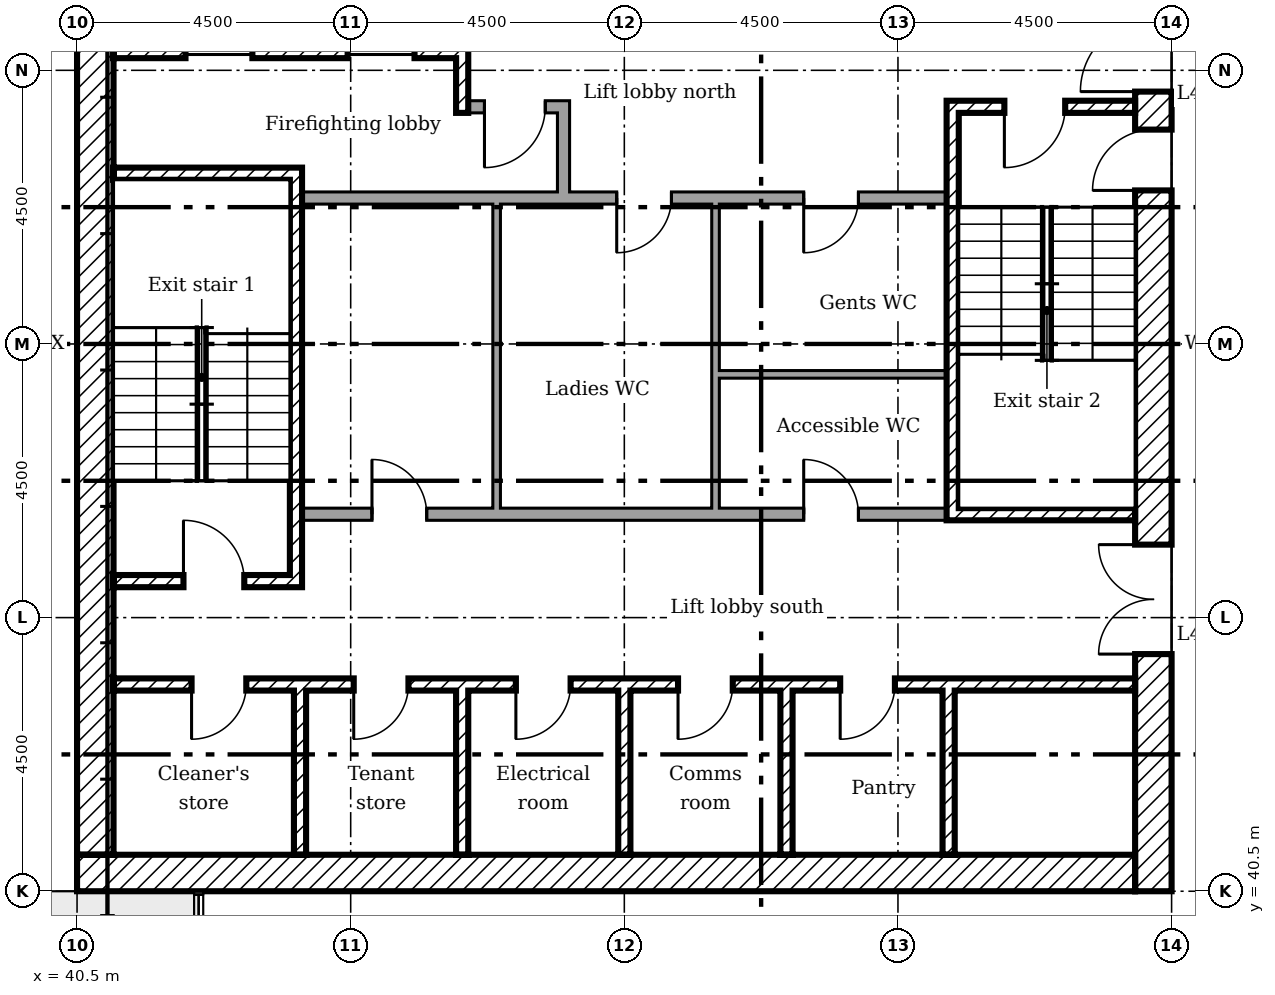
"""IFC4 building model, lengths in metres.
Left out: names, types, materials, properties, quantities, classifications, styles, units other than length and angle.
Written with IfcOpenShell. Run it as: python <this file> out.ifc"""

import sys

from ifc_helpers import new_model, si_unit, direction, frame, frame_2d, origin, place, context, subcontext, project, spatial, rectangle, extrude, element, fill, save


model = new_model("IFC4")
c1 = context("Model", 3, precision=1e-05, world=origin(), true_north=direction((0.0, 1.0)))
c2 = subcontext(c1, "Body", "Model", "MODEL_VIEW")
j1 = project(units=[si_unit("LENGTHUNIT", "METRE"), si_unit("PLANEANGLEUNIT", "RADIAN")], contexts=[c1])
p1 = place(None, origin())
s1 = spatial("IfcSite", under=j1, at=p1, CompositionType="ELEMENT")
p2 = place(p1, origin())
s2 = spatial("IfcBuilding", under=s1, at=p2, CompositionType="ELEMENT")
p3 = place(p2, frame((0.0, 0.0, 161.8)))
s3 = spatial("IfcBuildingStorey", under=s2, at=p3, CompositionType="ELEMENT", Elevation=161.8)
p4 = place(p3, frame((58.2, 40.5, 0.0), z_axis=(0.0, 0.0, 1.0), x_axis=(0.0, 1.0, 0.0)))
e1 = element("IfcWall", 1, at=p4, inside=s3, PredefinedType="SHEAR", context=c2, shape_type="SweptSolid", body=[
    extrude(rectangle(XDim=18.0, YDim=0.6, at=frame_2d((9.0, 0.0))), origin(), (0.0, 0.0, 1.0), 3.35),
])
p5 = place(p4, frame((13.15, 0.0, 0.0)))
e2 = element("IfcOpeningElement", 2, at=p5, cuts=e1, PredefinedType="OPENING", context=c2, shape_type="SweptSolid", body=[
    extrude(rectangle(XDim=1.2, YDim=2.1, at=frame_2d((0.6, 1.05))), frame((0.0, 0.31, 0.0), z_axis=(0.0, -1.0, 0.0), x_axis=(1.0, 0.0, 0.0)), (0.0, 0.0, 1.0), 0.62),
])
p6 = place(p4, frame((3.9, 0.0, 0.0)))
e3 = element("IfcOpeningElement", 3, at=p6, cuts=e1, PredefinedType="OPENING", context=c2, shape_type="SweptSolid", body=[
    extrude(rectangle(XDim=1.8, YDim=2.1, at=frame_2d((0.9, 1.05))), frame((0.0, 0.31, 0.0), z_axis=(0.0, -1.0, 0.0), x_axis=(1.0, 0.0, 0.0)), (0.0, 0.0, 1.0), 0.62),
])
p7 = place(p4, frame((11.525, 0.0, 0.0)))
e4 = element("IfcOpeningElement", 4, at=p7, cuts=e1, PredefinedType="OPENING", context=c2, shape_type="SweptSolid", body=[
    extrude(rectangle(XDim=1.0, YDim=2.1, at=frame_2d((0.5, 1.05))), frame((0.0, 0.31, 0.0), z_axis=(0.0, -1.0, 0.0), x_axis=(1.0, 0.0, 0.0)), (0.0, 0.0, 1.0), 0.62),
])
p8 = place(p3, frame((40.5, 40.8, 0.0)))
e5 = element("IfcWall", 5, at=p8, inside=s3, PredefinedType="SHEAR", context=c2, shape_type="SweptSolid", body=[
    extrude(rectangle(XDim=17.4, YDim=0.6, at=frame_2d((8.7, 0.0))), origin(), (0.0, 0.0, 1.0), 3.35),
])
p9 = place(p3, frame((40.8, 41.1, 0.0), z_axis=(0.0, 0.0, 1.0), x_axis=(0.0, 1.0, 0.0)))
e6 = element("IfcWall", 6, at=p9, inside=s3, PredefinedType="SHEAR", context=c2, shape_type="SweptSolid", body=[
    extrude(rectangle(XDim=16.8, YDim=0.6, at=frame_2d((8.4, 0.0))), origin(), (0.0, 0.0, 1.0), 3.35),
])
p10 = place(p3, frame((46.833, 57.9, 0.0), z_axis=(0.0, 0.0, 1.0), x_axis=(0.0, -1.0, 0.0)))
e7 = element("IfcWall", 7, at=p10, inside=s3, PredefinedType="SHEAR", context=c2, shape_type="SweptSolid", body=[
    extrude(rectangle(XDim=4.6, YDim=0.2, at=frame_2d((2.3, 0.0))), origin(), (0.0, 0.0, 1.0), 3.35),
])
for number, where, z_axis, x_axis in (
    (8, (44.167, 41.1, 0.0), (0.0, 0.0, 1.0), (0.0, 1.0, 0.0)),
    (9, (46.833, 41.1, 0.0), (0.0, 0.0, 1.0), (0.0, 1.0, 0.0)),
    (10, (49.5, 41.1, 0.0), (0.0, 0.0, 1.0), (0.0, 1.0, 0.0)),
    (11, (52.167, 41.1, 0.0), (0.0, 0.0, 1.0), (0.0, 1.0, 0.0)),
    (12, (54.833, 41.1, 0.0), (0.0, 0.0, 1.0), (0.0, 1.0, 0.0)),
):
    element("IfcWall", number, at=place(p3, frame(where, z_axis=z_axis, x_axis=x_axis)), inside=s3, PredefinedType="SHEAR", context=c2, shape_type="SweptSolid", body=[
        extrude(rectangle(XDim=2.7, YDim=0.2, at=frame_2d((1.35, 0.0))), origin(), (0.0, 0.0, 1.0), 3.35),
    ])
p11 = place(p3, frame((48.5, 51.9, 0.0), z_axis=(0.0, 0.0, 1.0), x_axis=(0.0, 1.0, 0.0)))
e13 = element("IfcWall", 13, at=p11, inside=s3, PredefinedType="PARTITIONING", context=c2, shape_type="SweptSolid", body=[
    extrude(rectangle(XDim=1.6, YDim=0.2, at=frame_2d((0.8, 0.0))), origin(), (0.0, 0.0, 1.0), 3.35),
])
p12 = place(p3, frame((46.933, 53.4, 0.0)))
e14 = element("IfcWall", 14, at=p12, inside=s3, PredefinedType="PARTITIONING", context=c2, shape_type="SweptSolid", body=[
    extrude(rectangle(XDim=1.467, YDim=0.2, at=frame_2d((0.733, 0.0))), origin(), (0.0, 0.0, 1.0), 3.35),
])
p13 = place(p12, frame((0.267, 0.0, 0.0)))
e15 = element("IfcOpeningElement", 15, at=p13, cuts=e14, PredefinedType="OPENING", context=c2, shape_type="SweptSolid", body=[
    extrude(rectangle(XDim=1.0, YDim=2.1, at=frame_2d((0.5, 1.05))), frame((0.0, 0.11, 0.0), z_axis=(0.0, -1.0, 0.0), x_axis=(1.0, 0.0, 0.0)), (0.0, 0.0, 1.0), 0.22),
])
p14 = place(p3, frame((41.1, 54.3, 0.0)))
e16 = element("IfcWall", 16, at=p14, inside=s3, PredefinedType="SHEAR", context=c2, shape_type="SweptSolid", body=[
    extrude(rectangle(XDim=5.633, YDim=0.2, at=frame_2d((2.817, 0.0))), origin(), (0.0, 0.0, 1.0), 3.35),
])
p15 = place(p14, frame((1.183, 0.0, 0.0)))
e17 = element("IfcOpeningElement", 17, at=p15, cuts=e16, PredefinedType="OPENING", context=c2, shape_type="SweptSolid", body=[
    extrude(rectangle(XDim=1.1, YDim=2.1, at=frame_2d((0.55, 1.05))), frame((0.0, 0.11, 0.0), z_axis=(0.0, -1.0, 0.0), x_axis=(1.0, 0.0, 0.0)), (0.0, 0.0, 1.0), 0.22),
])
p16 = place(p14, frame((3.85, 0.0, 0.0)))
e18 = element("IfcOpeningElement", 18, at=p16, cuts=e16, PredefinedType="OPENING", context=c2, shape_type="SweptSolid", body=[
    extrude(rectangle(XDim=1.1, YDim=2.1, at=frame_2d((0.55, 1.05))), frame((0.0, 0.11, 0.0), z_axis=(0.0, -1.0, 0.0), x_axis=(1.0, 0.0, 0.0)), (0.0, 0.0, 1.0), 0.22),
])
p17 = place(p3, frame((41.1, 43.9, 0.0)))
e19 = element("IfcWall", 19, at=p17, inside=s3, PredefinedType="SHEAR", context=c2, shape_type="SweptSolid", body=[
    extrude(rectangle(XDim=16.8, YDim=0.2, at=frame_2d((8.4, 0.0))), origin(), (0.0, 0.0, 1.0), 3.35),
])
p18 = place(p17, frame((1.283, 0.0, 0.0)))
e20 = element("IfcOpeningElement", 20, at=p18, cuts=e19, PredefinedType="OPENING", context=c2, shape_type="SweptSolid", body=[
    extrude(rectangle(XDim=0.9, YDim=2.1, at=frame_2d((0.45, 1.05))), frame((0.0, 0.11, 0.0), z_axis=(0.0, -1.0, 0.0), x_axis=(1.0, 0.0, 0.0)), (0.0, 0.0, 1.0), 0.22),
])
p19 = place(p17, frame((3.95, 0.0, 0.0)))
e21 = element("IfcOpeningElement", 21, at=p19, cuts=e19, PredefinedType="OPENING", context=c2, shape_type="SweptSolid", body=[
    extrude(rectangle(XDim=0.9, YDim=2.1, at=frame_2d((0.45, 1.05))), frame((0.0, 0.11, 0.0), z_axis=(0.0, -1.0, 0.0), x_axis=(1.0, 0.0, 0.0)), (0.0, 0.0, 1.0), 0.22),
])
p20 = place(p17, frame((6.617, 0.0, 0.0)))
e22 = element("IfcOpeningElement", 22, at=p20, cuts=e19, PredefinedType="OPENING", context=c2, shape_type="SweptSolid", body=[
    extrude(rectangle(XDim=0.9, YDim=2.1, at=frame_2d((0.45, 1.05))), frame((0.0, 0.11, 0.0), z_axis=(0.0, -1.0, 0.0), x_axis=(1.0, 0.0, 0.0)), (0.0, 0.0, 1.0), 0.22),
])
p21 = place(p17, frame((9.283, 0.0, 0.0)))
e23 = element("IfcOpeningElement", 23, at=p21, cuts=e19, PredefinedType="OPENING", context=c2, shape_type="SweptSolid", body=[
    extrude(rectangle(XDim=0.9, YDim=2.1, at=frame_2d((0.45, 1.05))), frame((0.0, 0.11, 0.0), z_axis=(0.0, -1.0, 0.0), x_axis=(1.0, 0.0, 0.0)), (0.0, 0.0, 1.0), 0.22),
])
p22 = place(p17, frame((11.95, 0.0, 0.0)))
e24 = element("IfcOpeningElement", 24, at=p22, cuts=e19, PredefinedType="OPENING", context=c2, shape_type="SweptSolid", body=[
    extrude(rectangle(XDim=0.9, YDim=2.1, at=frame_2d((0.45, 1.05))), frame((0.0, 0.11, 0.0), z_axis=(0.0, -1.0, 0.0), x_axis=(1.0, 0.0, 0.0)), (0.0, 0.0, 1.0), 0.22),
])
p23 = place(p3, frame((44.1, 45.5, 0.0), z_axis=(0.0, 0.0, 1.0), x_axis=(0.0, 1.0, 0.0)))
e25 = element("IfcWall", 25, at=p23, inside=s3, PredefinedType="SHEAR", context=c2, shape_type="SweptSolid", body=[
    extrude(rectangle(XDim=6.9, YDim=0.2, at=frame_2d((3.45, 0.0))), origin(), (0.0, 0.0, 1.0), 3.35),
])
p24 = place(p3, frame((41.1, 52.3, 0.0)))
e26 = element("IfcWall", 26, at=p24, inside=s3, PredefinedType="SHEAR", context=c2, shape_type="SweptSolid", body=[
    extrude(rectangle(XDim=2.9, YDim=0.2, at=frame_2d((1.45, 0.0))), origin(), (0.0, 0.0, 1.0), 3.35),
])
p25 = place(p3, frame((41.1, 45.6, 0.0)))
e27 = element("IfcWall", 27, at=p25, inside=s3, PredefinedType="SHEAR", context=c2, shape_type="SweptSolid", body=[
    extrude(rectangle(XDim=2.9, YDim=0.2, at=frame_2d((1.45, 0.0))), origin(), (0.0, 0.0, 1.0), 3.35),
])
p26 = place(p25, frame((1.15, 0.0, 0.0)))
e28 = element("IfcOpeningElement", 28, at=p26, cuts=e27, PredefinedType="OPENING", context=c2, shape_type="SweptSolid", body=[
    extrude(rectangle(XDim=1.0, YDim=2.1, at=frame_2d((0.5, 1.05))), frame((0.0, 0.11, 0.0), z_axis=(0.0, -1.0, 0.0), x_axis=(1.0, 0.0, 0.0)), (0.0, 0.0, 1.0), 0.22),
])
p27 = place(p3, frame((54.8, 53.4, 0.0)))
e29 = element("IfcWall", 29, at=p27, inside=s3, PredefinedType="SHEAR", context=c2, shape_type="SweptSolid", body=[
    extrude(rectangle(XDim=3.1, YDim=0.2, at=frame_2d((1.55, 0.0))), origin(), (0.0, 0.0, 1.0), 3.35),
])
p28 = place(p27, frame((0.95, 0.0, 0.0)))
e30 = element("IfcOpeningElement", 30, at=p28, cuts=e29, PredefinedType="OPENING", context=c2, shape_type="SweptSolid", body=[
    extrude(rectangle(XDim=1.0, YDim=2.1, at=frame_2d((0.5, 1.05))), frame((0.0, 0.11, 0.0), z_axis=(0.0, -1.0, 0.0), x_axis=(1.0, 0.0, 0.0)), (0.0, 0.0, 1.0), 0.22),
])
p29 = place(p3, frame((54.8, 46.7, 0.0)))
e31 = element("IfcWall", 31, at=p29, inside=s3, PredefinedType="SHEAR", context=c2, shape_type="SweptSolid", body=[
    extrude(rectangle(XDim=3.1, YDim=0.2, at=frame_2d((1.55, 0.0))), origin(), (0.0, 0.0, 1.0), 3.35),
])
p30 = place(p3, frame((54.9, 46.8, 0.0), z_axis=(0.0, 0.0, 1.0), x_axis=(0.0, 1.0, 0.0)))
e32 = element("IfcWall", 32, at=p30, inside=s3, PredefinedType="SHEAR", context=c2, shape_type="SweptSolid", body=[
    extrude(rectangle(XDim=6.5, YDim=0.2, at=frame_2d((3.25, 0.0))), origin(), (0.0, 0.0, 1.0), 3.35),
])
p31 = place(p3, frame((44.2, 51.9, 0.0)))
e33 = element("IfcWall", 33, at=p31, inside=s3, PredefinedType="PARTITIONING", context=c2, shape_type="SweptSolid", body=[
    extrude(rectangle(XDim=10.6, YDim=0.2, at=frame_2d((5.3, 0.0))), origin(), (0.0, 0.0, 1.0), 3.35),
])
p32 = place(p31, frame((5.175, 0.0, 0.0)))
e34 = element("IfcOpeningElement", 34, at=p32, cuts=e33, PredefinedType="OPENING", context=c2, shape_type="SweptSolid", body=[
    extrude(rectangle(XDim=0.9, YDim=2.1, at=frame_2d((0.45, 1.05))), frame((0.0, 0.11, 0.0), z_axis=(0.0, -1.0, 0.0), x_axis=(1.0, 0.0, 0.0)), (0.0, 0.0, 1.0), 0.22),
])
p33 = place(p31, frame((8.25, 0.0, 0.0)))
e35 = element("IfcOpeningElement", 35, at=p33, cuts=e33, PredefinedType="OPENING", context=c2, shape_type="SweptSolid", body=[
    extrude(rectangle(XDim=0.9, YDim=2.1, at=frame_2d((0.45, 1.05))), frame((0.0, 0.11, 0.0), z_axis=(0.0, -1.0, 0.0), x_axis=(1.0, 0.0, 0.0)), (0.0, 0.0, 1.0), 0.22),
])
p34 = place(p3, frame((44.2, 46.7, 0.0)))
e36 = element("IfcWall", 36, at=p34, inside=s3, PredefinedType="PARTITIONING", context=c2, shape_type="SweptSolid", body=[
    extrude(rectangle(XDim=10.6, YDim=0.2, at=frame_2d((5.3, 0.0))), origin(), (0.0, 0.0, 1.0), 3.35),
])
p35 = place(p34, frame((1.15, 0.0, 0.0)))
e37 = element("IfcOpeningElement", 37, at=p35, cuts=e36, PredefinedType="OPENING", context=c2, shape_type="SweptSolid", body=[
    extrude(rectangle(XDim=0.9, YDim=2.1, at=frame_2d((0.45, 1.05))), frame((0.0, 0.11, 0.0), z_axis=(0.0, -1.0, 0.0), x_axis=(1.0, 0.0, 0.0)), (0.0, 0.0, 1.0), 0.22),
])
p36 = place(p34, frame((8.25, 0.0, 0.0)))
e38 = element("IfcOpeningElement", 38, at=p36, cuts=e36, PredefinedType="OPENING", context=c2, shape_type="SweptSolid", body=[
    extrude(rectangle(XDim=0.9, YDim=2.1, at=frame_2d((0.45, 1.05))), frame((0.0, 0.11, 0.0), z_axis=(0.0, -1.0, 0.0), x_axis=(1.0, 0.0, 0.0)), (0.0, 0.0, 1.0), 0.22),
])
p37 = place(p3, frame((47.4, 46.8, 0.0), z_axis=(0.0, 0.0, 1.0), x_axis=(0.0, 1.0, 0.0)))
e39 = element("IfcWall", 39, at=p37, inside=s3, PredefinedType="PARTITIONING", context=c2, shape_type="SweptSolid", body=[
    extrude(rectangle(XDim=5.0, YDim=0.125, at=frame_2d((2.5, 0.0))), origin(), (0.0, 0.0, 1.0), 3.35),
])
p38 = place(p3, frame((51.0, 46.8, 0.0), z_axis=(0.0, 0.0, 1.0), x_axis=(0.0, 1.0, 0.0)))
e40 = element("IfcWall", 40, at=p38, inside=s3, PredefinedType="PARTITIONING", context=c2, shape_type="SweptSolid", body=[
    extrude(rectangle(XDim=2.262, YDim=0.125, at=frame_2d((1.131, 0.0))), origin(), (0.0, 0.0, 1.0), 3.35),
])
p39 = place(p3, frame((54.8, 49.0, 0.0), z_axis=(0.0, 0.0, 1.0), x_axis=(-1.0, 0.0, 0.0)))
e41 = element("IfcWall", 41, at=p39, inside=s3, PredefinedType="PARTITIONING", context=c2, shape_type="SweptSolid", body=[
    extrude(rectangle(XDim=3.738, YDim=0.125, at=frame_2d((1.869, 0.0))), origin(), (0.0, 0.0, 1.0), 3.35),
])
p40 = place(p3, frame((51.0, 49.0, 0.0), z_axis=(0.0, 0.0, 1.0), x_axis=(0.0, 1.0, 0.0)))
e42 = element("IfcWall", 42, at=p40, inside=s3, PredefinedType="PARTITIONING", context=c2, shape_type="SweptSolid", body=[
    extrude(rectangle(XDim=2.8, YDim=0.125, at=frame_2d((1.4, 0.0))), origin(), (0.0, 0.0, 1.0), 3.35),
])
p41 = place(p5, origin())
e43 = element("IfcDoor", 43, at=p41, inside=s3, OperationType="SINGLE_SWING_RIGHT", PredefinedType="DOOR", context=c2, shape_type="SweptSolid", body=[
    extrude(rectangle(XDim=1.2, YDim=2.1, at=frame_2d((0.6, 1.05))), frame((0.0, 0.025, 0.0), z_axis=(0.0, -1.0, 0.0), x_axis=(1.0, 0.0, 0.0)), (0.0, 0.0, 1.0), 0.05),
])
fill(e2, e43)
p42 = place(p6, origin())
e44 = element("IfcDoor", 44, at=p42, inside=s3, OperationType="DOUBLE_DOOR_SINGLE_SWING", PredefinedType="DOOR", context=c2, shape_type="SweptSolid", body=[
    extrude(rectangle(XDim=1.8, YDim=2.1, at=frame_2d((0.9, 1.05))), frame((0.0, 0.025, 0.0), z_axis=(0.0, -1.0, 0.0), x_axis=(1.0, 0.0, 0.0)), (0.0, 0.0, 1.0), 0.05),
])
fill(e3, e44)
p43 = place(p26, origin())
e45 = element("IfcDoor", 45, at=p43, inside=s3, OperationType="SINGLE_SWING_RIGHT", PredefinedType="DOOR", context=c2, shape_type="SweptSolid", body=[
    extrude(rectangle(XDim=1.0, YDim=2.1, at=frame_2d((0.5, 1.05))), frame((0.0, 0.025, 0.0), z_axis=(0.0, -1.0, 0.0), x_axis=(1.0, 0.0, 0.0)), (0.0, 0.0, 1.0), 0.05),
])
fill(e28, e45)
p44 = place(p28, frame((1.0, 0.0, 0.0), x_axis=(-1.0, 0.0, 0.0)))
e46 = element("IfcDoor", 46, at=p44, inside=s3, OperationType="SINGLE_SWING_LEFT", PredefinedType="DOOR", context=c2, shape_type="SweptSolid", body=[
    extrude(rectangle(XDim=1.0, YDim=2.1, at=frame_2d((0.5, 1.05))), frame((0.0, 0.025, 0.0), z_axis=(0.0, -1.0, 0.0), x_axis=(1.0, 0.0, 0.0)), (0.0, 0.0, 1.0), 0.05),
])
fill(e30, e46)
p45 = place(p7, origin())
e47 = element("IfcDoor", 47, at=p45, inside=s3, OperationType="SINGLE_SWING_RIGHT", PredefinedType="DOOR", context=c2, shape_type="SweptSolid", body=[
    extrude(rectangle(XDim=1.0, YDim=2.1, at=frame_2d((0.5, 1.05))), frame((0.0, 0.025, 0.0), z_axis=(0.0, -1.0, 0.0), x_axis=(1.0, 0.0, 0.0)), (0.0, 0.0, 1.0), 0.05),
])
fill(e4, e47)
p46 = place(p13, frame((1.0, 0.0, 0.0), x_axis=(-1.0, 0.0, 0.0)))
e48 = element("IfcDoor", 48, at=p46, inside=s3, OperationType="SINGLE_SWING_LEFT", PredefinedType="DOOR", context=c2, shape_type="SweptSolid", body=[
    extrude(rectangle(XDim=1.0, YDim=2.1, at=frame_2d((0.5, 1.05))), frame((0.0, 0.025, 0.0), z_axis=(0.0, -1.0, 0.0), x_axis=(1.0, 0.0, 0.0)), (0.0, 0.0, 1.0), 0.05),
])
fill(e15, e48)
p47 = place(p18, frame((0.9, 0.0, 0.0), x_axis=(-1.0, 0.0, 0.0)))
e49 = element("IfcDoor", 49, at=p47, inside=s3, OperationType="SINGLE_SWING_LEFT", PredefinedType="DOOR", context=c2, shape_type="SweptSolid", body=[
    extrude(rectangle(XDim=0.9, YDim=2.1, at=frame_2d((0.45, 1.05))), frame((0.0, 0.025, 0.0), z_axis=(0.0, -1.0, 0.0), x_axis=(1.0, 0.0, 0.0)), (0.0, 0.0, 1.0), 0.05),
])
fill(e20, e49)
p48 = place(p19, frame((0.9, 0.0, 0.0), x_axis=(-1.0, 0.0, 0.0)))
e50 = element("IfcDoor", 50, at=p48, inside=s3, OperationType="SINGLE_SWING_LEFT", PredefinedType="DOOR", context=c2, shape_type="SweptSolid", body=[
    extrude(rectangle(XDim=0.9, YDim=2.1, at=frame_2d((0.45, 1.05))), frame((0.0, 0.025, 0.0), z_axis=(0.0, -1.0, 0.0), x_axis=(1.0, 0.0, 0.0)), (0.0, 0.0, 1.0), 0.05),
])
fill(e21, e50)
p49 = place(p20, frame((0.9, 0.0, 0.0), x_axis=(-1.0, 0.0, 0.0)))
e51 = element("IfcDoor", 51, at=p49, inside=s3, OperationType="SINGLE_SWING_LEFT", PredefinedType="DOOR", context=c2, shape_type="SweptSolid", body=[
    extrude(rectangle(XDim=0.9, YDim=2.1, at=frame_2d((0.45, 1.05))), frame((0.0, 0.025, 0.0), z_axis=(0.0, -1.0, 0.0), x_axis=(1.0, 0.0, 0.0)), (0.0, 0.0, 1.0), 0.05),
])
fill(e22, e51)
p50 = place(p21, frame((0.9, 0.0, 0.0), x_axis=(-1.0, 0.0, 0.0)))
e52 = element("IfcDoor", 52, at=p50, inside=s3, OperationType="SINGLE_SWING_LEFT", PredefinedType="DOOR", context=c2, shape_type="SweptSolid", body=[
    extrude(rectangle(XDim=0.9, YDim=2.1, at=frame_2d((0.45, 1.05))), frame((0.0, 0.025, 0.0), z_axis=(0.0, -1.0, 0.0), x_axis=(1.0, 0.0, 0.0)), (0.0, 0.0, 1.0), 0.05),
])
fill(e23, e52)
p51 = place(p22, frame((0.9, 0.0, 0.0), x_axis=(-1.0, 0.0, 0.0)))
e53 = element("IfcDoor", 53, at=p51, inside=s3, OperationType="SINGLE_SWING_LEFT", PredefinedType="DOOR", context=c2, shape_type="SweptSolid", body=[
    extrude(rectangle(XDim=0.9, YDim=2.1, at=frame_2d((0.45, 1.05))), frame((0.0, 0.025, 0.0), z_axis=(0.0, -1.0, 0.0), x_axis=(1.0, 0.0, 0.0)), (0.0, 0.0, 1.0), 0.05),
])
fill(e24, e53)
p52 = place(p35, origin())
e54 = element("IfcDoor", 54, at=p52, inside=s3, OperationType="SINGLE_SWING_RIGHT", PredefinedType="DOOR", context=c2, shape_type="SweptSolid", body=[
    extrude(rectangle(XDim=0.9, YDim=2.1, at=frame_2d((0.45, 1.05))), frame((0.0, 0.025, 0.0), z_axis=(0.0, -1.0, 0.0), x_axis=(1.0, 0.0, 0.0)), (0.0, 0.0, 1.0), 0.05),
])
fill(e37, e54)
p53 = place(p32, frame((0.9, 0.0, 0.0), x_axis=(-1.0, 0.0, 0.0)))
e55 = element("IfcDoor", 55, at=p53, inside=s3, OperationType="SINGLE_SWING_LEFT", PredefinedType="DOOR", context=c2, shape_type="SweptSolid", body=[
    extrude(rectangle(XDim=0.9, YDim=2.1, at=frame_2d((0.45, 1.05))), frame((0.0, 0.025, 0.0), z_axis=(0.0, -1.0, 0.0), x_axis=(1.0, 0.0, 0.0)), (0.0, 0.0, 1.0), 0.05),
])
fill(e34, e55)
p54 = place(p36, origin())
e56 = element("IfcDoor", 56, at=p54, inside=s3, OperationType="SINGLE_SWING_RIGHT", PredefinedType="DOOR", context=c2, shape_type="SweptSolid", body=[
    extrude(rectangle(XDim=0.9, YDim=2.1, at=frame_2d((0.45, 1.05))), frame((0.0, 0.025, 0.0), z_axis=(0.0, -1.0, 0.0), x_axis=(1.0, 0.0, 0.0)), (0.0, 0.0, 1.0), 0.05),
])
fill(e38, e56)
p55 = place(p33, frame((0.9, 0.0, 0.0), x_axis=(-1.0, 0.0, 0.0)))
e57 = element("IfcDoor", 57, at=p55, inside=s3, OperationType="SINGLE_SWING_LEFT", PredefinedType="DOOR", context=c2, shape_type="SweptSolid", body=[
    extrude(rectangle(XDim=0.9, YDim=2.1, at=frame_2d((0.45, 1.05))), frame((0.0, 0.025, 0.0), z_axis=(0.0, -1.0, 0.0), x_axis=(1.0, 0.0, 0.0)), (0.0, 0.0, 1.0), 0.05),
])
fill(e35, e57)
p56 = place(p15, origin())
e58 = element("IfcDoor", 58, at=p56, inside=s3, OperationType="SLIDING_TO_LEFT", PredefinedType="DOOR", context=c2, shape_type="SweptSolid", body=[
    extrude(rectangle(XDim=1.1, YDim=2.1, at=frame_2d((0.55, 1.05))), frame((0.0, 0.025, 0.0), z_axis=(0.0, -1.0, 0.0), x_axis=(1.0, 0.0, 0.0)), (0.0, 0.0, 1.0), 0.05),
])
fill(e17, e58)
p57 = place(p16, origin())
e59 = element("IfcDoor", 59, at=p57, inside=s3, OperationType="SLIDING_TO_LEFT", PredefinedType="DOOR", context=c2, shape_type="SweptSolid", body=[
    extrude(rectangle(XDim=1.1, YDim=2.1, at=frame_2d((0.55, 1.05))), frame((0.0, 0.025, 0.0), z_axis=(0.0, -1.0, 0.0), x_axis=(1.0, 0.0, 0.0)), (0.0, 0.0, 1.0), 0.05),
])
fill(e18, e59)
save(model, sys.argv[1])
